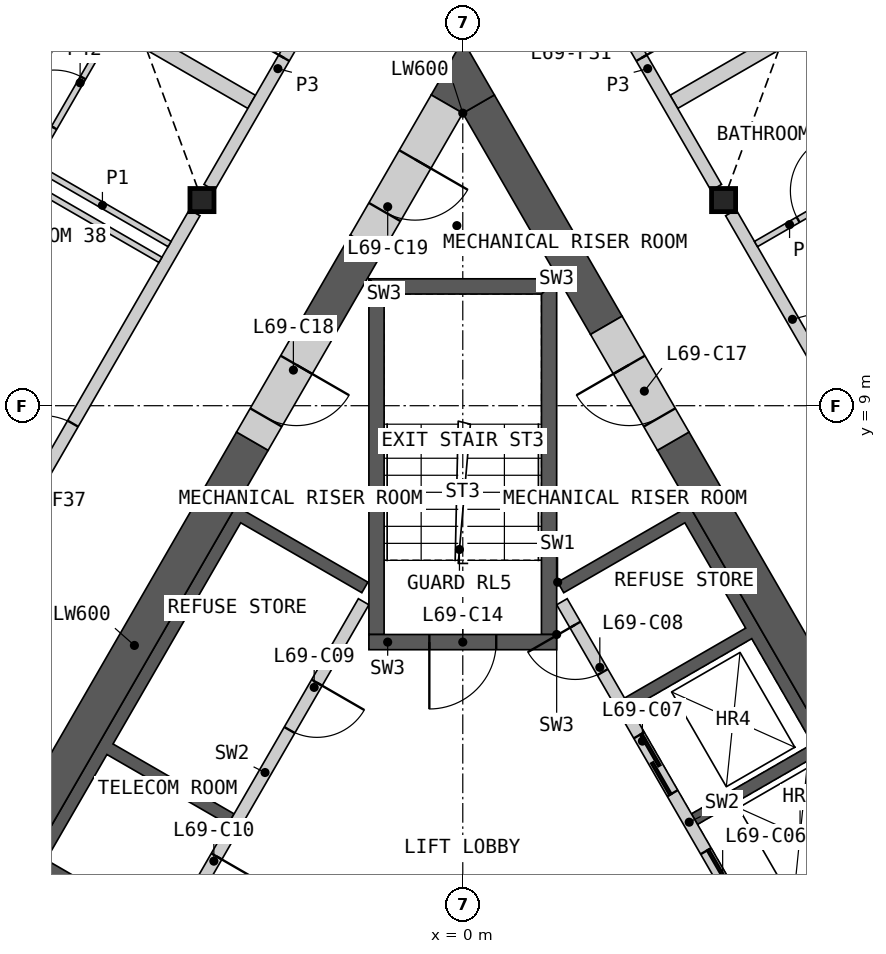
"""IFC4 building model, lengths in metres.
Left out: names, types, materials, properties, quantities, classifications, styles, units other than length and angle.
Written with IfcOpenShell. Run it as: python <this file> out.ifc"""

import sys

from ifc_helpers import new_model, si_unit, direction, frame, frame_2d, origin, origin_2d, place, context, subcontext, project, spatial, polyline, rectangle, i_section, outline, extrude, element, fill, save


model = new_model("IFC4")
c1 = context("Model", 3, precision=1e-05, world=origin(), true_north=direction((0.0, 1.0)))
c2 = subcontext(c1, "Body", "Model", "MODEL_VIEW")
j1 = project(units=[si_unit("LENGTHUNIT", "METRE"), si_unit("PLANEANGLEUNIT", "RADIAN")], contexts=[c1])
p1 = place(None, origin())
s1 = spatial("IfcSite", under=j1, at=p1, CompositionType="ELEMENT")
p2 = place(p1, origin())
s2 = spatial("IfcBuilding", under=s1, at=p2, CompositionType="ELEMENT")
p3 = place(p2, frame((0.0, 0.0, 315.4)))
s3 = spatial("IfcBuildingStorey", under=s2, at=p3, CompositionType="ELEMENT", Elevation=315.4)
for number, where, z_axis, x_axis in (
    (1, (-4.289, 12.382, 0.0), (0.0, 0.0, 1.0), (1.0, 0.0, 0.0)),
    (2, (4.289, 12.382, 0.0), (0.0, 0.0, 1.0), (1.0, 0.0, 0.0)),
):
    element("IfcColumn", number, at=place(p3, frame(where, z_axis=z_axis, x_axis=x_axis)), inside=s3, PredefinedType="COLUMN", context=c2, shape_type="SweptSolid", body=[
        extrude(i_section(OverallWidth=0.396, OverallDepth=0.381, WebThickness=0.019, FlangeThickness=0.03, at=origin_2d()), origin(), (0.0, 0.0, 1.0), 3.4),
    ])
p4 = place(p3, origin())
e3 = element("IfcWall", 3, at=p4, inside=s3, PredefinedType="SHEAR", context=c2, shape_type="SweptSolid", body=[
    extrude(outline(polyline([(1.561, 6.097), (3.731, 7.35), (8.231, -0.444), (6.061, -1.697), (5.96, -1.524), (7.952, -0.374), (6.952, 1.358), (4.96, 0.208), (4.861, 0.381), (6.852, 1.531), (5.852, 3.263), (3.861, 2.113), (3.76, 2.287), (5.752, 3.437), (4.752, 5.169), (2.76, 4.019), (2.66, 4.192), (4.652, 5.342), (3.652, 7.074), (1.66, 5.924), (1.561, 6.097)])), origin(), (0.0, 0.0, 1.0), 3.1),
])
p5 = place(p3, frame((5.817, -1.476, 0.0), z_axis=(0.0, 0.0, 1.0), x_axis=(-0.500002616675, 0.866023893041, 0.0)))
e4 = element("IfcWall", 4, at=p5, inside=s3, PredefinedType="SOLIDWALL", context=c2, shape_type="SweptSolid", body=[
    extrude(rectangle(XDim=8.373, YDim=0.2, at=frame_2d((4.187, 0.0))), origin(), (0.0, 0.0, 1.0), 3.1),
])
p6 = place(p5, frame((0.337, 0.0, 0.0)))
e5 = element("IfcOpeningElement", 5, at=p6, cuts=e4, PredefinedType="OPENING", context=c2, shape_type="SweptSolid", body=[
    extrude(rectangle(XDim=1.1, YDim=2.1, at=frame_2d((0.55, 1.05))), frame((0.0, 0.11, 0.0), z_axis=(0.0, -1.0, 0.0), x_axis=(1.0, 0.0, 0.0)), (0.0, 0.0, 1.0), 0.22),
])
p7 = place(p5, frame((2.537, 0.0, 0.0)))
e6 = element("IfcOpeningElement", 6, at=p7, cuts=e4, PredefinedType="OPENING", context=c2, shape_type="SweptSolid", body=[
    extrude(rectangle(XDim=1.1, YDim=2.1, at=frame_2d((0.55, 1.05))), frame((0.0, 0.11, 0.0), z_axis=(0.0, -1.0, 0.0), x_axis=(1.0, 0.0, 0.0)), (0.0, 0.0, 1.0), 0.22),
])
p8 = place(p5, frame((4.737, 0.0, 0.0)))
e7 = element("IfcOpeningElement", 7, at=p8, cuts=e4, PredefinedType="OPENING", context=c2, shape_type="SweptSolid", body=[
    extrude(rectangle(XDim=1.1, YDim=2.1, at=frame_2d((0.55, 1.05))), frame((0.0, 0.11, 0.0), z_axis=(0.0, -1.0, 0.0), x_axis=(1.0, 0.0, 0.0)), (0.0, 0.0, 1.0), 0.22),
])
p9 = place(p5, frame((7.037, 0.0, 0.0)))
e8 = element("IfcOpeningElement", 8, at=p9, cuts=e4, PredefinedType="OPENING", context=c2, shape_type="SweptSolid", body=[
    extrude(rectangle(XDim=0.9, YDim=2.1, at=frame_2d((0.45, 1.05))), frame((0.0, 0.11, 0.0), z_axis=(0.0, -1.0, 0.0), x_axis=(1.0, 0.0, 0.0)), (0.0, 0.0, 1.0), 0.22),
])
p10 = place(p3, origin())
e9 = element("IfcWall", 9, at=p10, inside=s3, PredefinedType="SHEAR", context=c2, shape_type="SweptSolid", body=[
    extrude(outline(polyline([(-4.96, 0.208), (-7.131, 1.461), (-3.731, 7.35), (-1.561, 6.097), (-1.66, 5.924), (-3.652, 7.074), (-5.752, 3.437), (-3.76, 2.287), (-3.861, 2.113), (-5.852, 3.263), (-6.852, 1.531), (-4.861, 0.381), (-4.96, 0.208)])), origin(), (0.0, 0.0, 1.0), 3.1),
])
p11 = place(p3, frame((-1.631, 5.776, 0.0), z_axis=(0.0, 0.0, 1.0), x_axis=(-0.499992876559, -0.866029516466, 0.0)))
e10 = element("IfcWall", 10, at=p11, inside=s3, PredefinedType="SOLIDWALL", context=c2, shape_type="SweptSolid", body=[
    extrude(rectangle(XDim=6.486, YDim=0.2, at=frame_2d((3.243, 0.0))), origin(), (0.0, 0.0, 1.0), 3.1),
])
p12 = place(p11, frame((1.537, 0.0, 0.0)))
e11 = element("IfcOpeningElement", 11, at=p12, cuts=e10, PredefinedType="OPENING", context=c2, shape_type="SweptSolid", body=[
    extrude(rectangle(XDim=0.9, YDim=2.1, at=frame_2d((0.45, 1.05))), frame((0.0, 0.11, 0.0), z_axis=(0.0, -1.0, 0.0), x_axis=(1.0, 0.0, 0.0)), (0.0, 0.0, 1.0), 0.22),
])
p13 = place(p11, frame((4.837, 0.0, 0.0)))
e12 = element("IfcOpeningElement", 12, at=p13, cuts=e10, PredefinedType="OPENING", context=c2, shape_type="SweptSolid", body=[
    extrude(rectangle(XDim=0.9, YDim=2.1, at=frame_2d((0.45, 1.05))), frame((0.0, 0.11, 0.0), z_axis=(0.0, -1.0, 0.0), x_axis=(1.0, 0.0, 0.0)), (0.0, 0.0, 1.0), 0.22),
])
p14 = place(p3, origin())
e13 = element("IfcWall", 13, at=p14, inside=s3, PredefinedType="SHEAR", context=c2, shape_type="SweptSolid", body=[
    extrude(outline(polyline([(1.544, 5.237), (1.544, 11.087), (1.294, 10.837), (1.294, 5.237), (1.544, 5.237)])), origin(), (0.0, 0.0, 1.0), 3.1),
])
p15 = place(p3, origin())
e14 = element("IfcWall", 14, at=p15, inside=s3, PredefinedType="SHEAR", context=c2, shape_type="SweptSolid", body=[
    extrude(outline(polyline([(1.544, 11.087), (-1.544, 11.087), (-1.294, 10.837), (1.294, 10.837), (1.544, 11.087)])), origin(), (0.0, 0.0, 1.0), 3.1),
])
p16 = place(p3, origin())
e15 = element("IfcWall", 15, at=p16, inside=s3, PredefinedType="SHEAR", context=c2, shape_type="SweptSolid", body=[
    extrude(outline(polyline([(-1.294, 10.837), (-1.544, 11.087), (-1.544, 5.237), (-1.294, 5.237), (-1.294, 10.837)])), origin(), (0.0, 0.0, 1.0), 3.1),
])
p17 = place(p3, frame((1.544, 5.112, 0.0), z_axis=(0.0, 0.0, 1.0), x_axis=(-1.0, 0.0, 0.0)))
e16 = element("IfcWall", 16, at=p17, inside=s3, PredefinedType="SHEAR", context=c2, shape_type="SweptSolid", body=[
    extrude(rectangle(XDim=3.088, YDim=0.25, at=frame_2d((1.544, 0.0))), origin(), (0.0, 0.0, 1.0), 3.1),
])
p18 = place(p17, frame((0.994, 0.0, 0.0)))
e17 = element("IfcOpeningElement", 17, at=p18, cuts=e16, PredefinedType="OPENING", context=c2, shape_type="SweptSolid", body=[
    extrude(rectangle(XDim=1.1, YDim=2.1, at=frame_2d((0.55, 1.05))), frame((0.0, 0.135, 0.0), z_axis=(0.0, -1.0, 0.0), x_axis=(1.0, 0.0, 0.0)), (0.0, 0.0, 1.0), 0.27),
])
p19 = place(p3, frame((8.686, -0.634, 0.0), z_axis=(0.0, 0.0, 1.0), x_axis=(-0.50001836461, 0.866014800712, 0.0)))
e18 = element("IfcWall", 18, at=p19, inside=s3, PredefinedType="SHEAR", context=c2, shape_type="SweptSolid", body=[
    extrude(rectangle(XDim=10.451, YDim=0.6, at=frame_2d((5.225, 0.0))), origin(), (0.0, 0.0, 1.0), 3.1),
])
p20 = place(p3, frame((2.361, 10.322, 0.0), z_axis=(0.0, 0.0, 1.0), x_axis=(-0.500000735859, 0.866024978935, 0.0)))
e19 = element("IfcWall", 19, at=p20, inside=s3, PredefinedType="SHEAR", context=c2, shape_type="SweptSolid", body=[
    extrude(rectangle(XDim=4.202, YDim=0.6, at=frame_2d((2.101, 0.0))), origin(), (0.0, 0.0, 1.0), 3.1),
])
p21 = place(p3, frame((-3.461, 8.417, 0.0), z_axis=(0.0, 0.0, 1.0), x_axis=(-0.50000391502, -0.866023143435, 0.0)))
e20 = element("IfcWall", 20, at=p21, inside=s3, PredefinedType="SHEAR", context=c2, shape_type="SweptSolid", body=[
    extrude(rectangle(XDim=7.759, YDim=0.6, at=frame_2d((3.879, 0.0))), origin(), (0.0, 0.0, 1.0), 3.1),
])
p22 = place(p3, frame((-1.59, 11.658, 0.0), z_axis=(0.0, 0.0, 1.0), x_axis=(-0.500037594623, -0.866003697431, 0.0)))
e21 = element("IfcWall", 21, at=p22, inside=s3, PredefinedType="SHEAR", context=c2, shape_type="SweptSolid", body=[
    extrude(rectangle(XDim=1.542, YDim=0.6, at=frame_2d((0.771, 0.0))), origin(), (0.0, 0.0, 1.0), 3.1),
])
p23 = place(p3, origin())
e22 = element("IfcWall", 22, at=p23, inside=s3, PredefinedType="SHEAR", context=c2, shape_type="SweptSolid", body=[
    extrude(outline(polyline([(0.0, 13.811), (-0.52, 14.111), (0.0, 15.011), (0.52, 14.111), (0.0, 13.811)])), origin(), (0.0, 0.0, 1.0), 3.1),
])
p24 = place(p3, frame((3.461, 8.417, 0.0), z_axis=(0.0, 0.0, 1.0), x_axis=(-0.499946605688, 0.86605622881, 0.0)))
e23 = element("IfcWall", 23, at=p24, inside=s3, PredefinedType="SHEAR", context=c2, shape_type="SweptSolid", body=[
    extrude(rectangle(XDim=2.2, YDim=0.6, at=frame_2d((1.1, 0.0))), origin(), (0.0, 0.0, 1.0), 3.1),
])
p25 = place(p24, frame((0.45, 0.0, 0.0)))
e24 = element("IfcOpeningElement", 24, at=p25, cuts=e23, PredefinedType="OPENING", context=c2, shape_type="SweptSolid", body=[
    extrude(rectangle(XDim=1.0, YDim=2.1, at=frame_2d((0.5, 1.05))), frame((0.0, 0.31, 0.0), z_axis=(0.0, -1.0, 0.0), x_axis=(1.0, 0.0, 0.0)), (0.0, 0.0, 1.0), 0.62),
])
p26 = place(p3, frame((-2.361, 10.322, 0.0), z_axis=(0.0, 0.0, 1.0), x_axis=(-0.499946605688, -0.86605622881, 0.0)))
e25 = element("IfcWall", 25, at=p26, inside=s3, PredefinedType="SHEAR", context=c2, shape_type="SweptSolid", body=[
    extrude(rectangle(XDim=2.2, YDim=0.6, at=frame_2d((1.1, 0.0))), origin(), (0.0, 0.0, 1.0), 3.1),
])
p27 = place(p26, frame((0.75, 0.0, 0.0)))
e26 = element("IfcOpeningElement", 26, at=p27, cuts=e25, PredefinedType="OPENING", context=c2, shape_type="SweptSolid", body=[
    extrude(rectangle(XDim=1.0, YDim=2.1, at=frame_2d((0.5, 1.05))), frame((0.0, 0.31, 0.0), z_axis=(0.0, -1.0, 0.0), x_axis=(1.0, 0.0, 0.0)), (0.0, 0.0, 1.0), 0.62),
])
p28 = place(p3, frame((-0.26, 13.961, 0.0), z_axis=(0.0, 0.0, 1.0), x_axis=(-0.49997936161, -0.866037319036, 0.0)))
e27 = element("IfcWall", 27, at=p28, inside=s3, PredefinedType="SHEAR", context=c2, shape_type="SweptSolid", body=[
    extrude(rectangle(XDim=2.66, YDim=0.6, at=frame_2d((1.33, 0.0))), origin(), (0.0, 0.0, 1.0), 3.1),
])
p29 = place(p28, frame((1.05, 0.0, 0.0)))
e28 = element("IfcOpeningElement", 28, at=p29, cuts=e27, PredefinedType="OPENING", context=c2, shape_type="SweptSolid", body=[
    extrude(rectangle(XDim=1.0, YDim=2.1, at=frame_2d((0.5, 1.05))), frame((0.0, 0.31, 0.0), z_axis=(0.0, -1.0, 0.0), x_axis=(1.0, 0.0, 0.0)), (0.0, 0.0, 1.0), 0.62),
])
p30 = place(p3, frame((3.472, 13.997, 0.0), z_axis=(0.0, 0.0, 1.0), x_axis=(0.866029233976, 0.499993365855, 0.0)))
e29 = element("IfcWall", 29, at=p30, inside=s3, PredefinedType="PARTITIONING", context=c2, shape_type="SweptSolid", body=[
    extrude(rectangle(XDim=12.637, YDim=0.25, at=frame_2d((6.319, 0.0))), origin(), (0.0, 0.0, 1.0), 2.33),
])
p31 = place(p3, frame((-8.458, 5.16, 0.0), z_axis=(0.0, 0.0, 1.0), x_axis=(0.499984266882, 0.866034487114, 0.0)))
e30 = element("IfcWall", 30, at=p31, inside=s3, PredefinedType="PARTITIONING", context=c2, shape_type="SweptSolid", body=[
    extrude(rectangle(XDim=8.099, YDim=0.2, at=frame_2d((4.049, 0.0))), origin(), (0.0, 0.0, 1.0), 3.1),
])
p32 = place(p31, frame((3.093, 0.0, 0.0)))
e31 = element("IfcOpeningElement", 31, at=p32, cuts=e30, PredefinedType="OPENING", context=c2, shape_type="SweptSolid", body=[
    extrude(rectangle(XDim=1.0, YDim=2.1, at=frame_2d((0.5, 1.05))), frame((0.0, 0.11, 0.0), z_axis=(0.0, -1.0, 0.0), x_axis=(1.0, 0.0, 0.0)), (0.0, 0.0, 1.0), 0.22),
])
p33 = place(p3, frame((4.409, 12.174, 0.0), z_axis=(0.0, 0.0, 1.0), x_axis=(0.499984266882, -0.866034487114, 0.0)))
e32 = element("IfcWall", 32, at=p33, inside=s3, PredefinedType="PARTITIONING", context=c2, shape_type="SweptSolid", body=[
    extrude(rectangle(XDim=8.099, YDim=0.2, at=frame_2d((4.049, 0.0))), origin(), (0.0, 0.0, 1.0), 3.1),
])
p34 = place(p33, frame((3.905, 0.0, 0.0)))
e33 = element("IfcOpeningElement", 33, at=p34, cuts=e32, PredefinedType="OPENING", context=c2, shape_type="SweptSolid", body=[
    extrude(rectangle(XDim=1.0, YDim=2.1, at=frame_2d((0.5, 1.05))), frame((0.0, 0.11, 0.0), z_axis=(0.0, -1.0, 0.0), x_axis=(1.0, 0.0, 0.0)), (0.0, 0.0, 1.0), 0.22),
])
p35 = place(p3, frame((-8.257, 16.76, 0.0), z_axis=(0.0, 0.0, 1.0), x_axis=(0.866034739526, -0.499983829672, 0.0)))
e34 = element("IfcWall", 34, at=p35, inside=s3, PredefinedType="PARTITIONING", context=c2, shape_type="SweptSolid", body=[
    extrude(rectangle(XDim=5.525, YDim=0.25, at=frame_2d((2.763, 0.0))), origin(), (0.0, 0.0, 1.0), 2.33),
])
p36 = place(p3, frame((1.913, 16.498, 0.0), z_axis=(0.0, 0.0, 1.0), x_axis=(0.499950370306, -0.866054055606, 0.0)))
e35 = element("IfcWall", 35, at=p36, inside=s3, PredefinedType="PARTITIONING", context=c2, shape_type="SweptSolid", body=[
    extrude(rectangle(XDim=4.513, YDim=0.2, at=frame_2d((2.256, 0.0))), origin(), (0.0, 0.0, 1.0), 3.1),
])
p37 = place(p36, frame((1.053, 0.0, 0.0)))
e36 = element("IfcOpeningElement", 36, at=p37, cuts=e35, PredefinedType="OPENING", context=c2, shape_type="SweptSolid", body=[
    extrude(rectangle(XDim=1.0, YDim=2.1, at=frame_2d((0.5, 1.05))), frame((0.0, 0.11, 0.0), z_axis=(0.0, -1.0, 0.0), x_axis=(1.0, 0.0, 0.0)), (0.0, 0.0, 1.0), 0.22),
])
p38 = place(p3, frame((-4.169, 12.59, 0.0), z_axis=(0.0, 0.0, 1.0), x_axis=(0.499950370306, 0.866054055606, 0.0)))
e37 = element("IfcWall", 37, at=p38, inside=s3, PredefinedType="PARTITIONING", context=c2, shape_type="SweptSolid", body=[
    extrude(rectangle(XDim=4.513, YDim=0.2, at=frame_2d((2.256, 0.0))), origin(), (0.0, 0.0, 1.0), 3.1),
])
p39 = place(p38, frame((2.459, 0.0, 0.0)))
e38 = element("IfcOpeningElement", 38, at=p39, cuts=e37, PredefinedType="OPENING", context=c2, shape_type="SweptSolid", body=[
    extrude(rectangle(XDim=1.0, YDim=2.1, at=frame_2d((0.5, 1.05))), frame((0.0, 0.11, 0.0), z_axis=(0.0, -1.0, 0.0), x_axis=(1.0, 0.0, 0.0)), (0.0, 0.0, 1.0), 0.22),
])
p40 = place(p3, frame((-9.783, 14.177, 0.0), z_axis=(0.0, 0.0, 1.0), x_axis=(0.866030435321, -0.499991285022, 0.0)))
e39 = element("IfcWall", 39, at=p40, inside=s3, PredefinedType="PARTITIONING", context=c2, shape_type="SweptSolid", body=[
    extrude(rectangle(XDim=5.555, YDim=0.1, at=frame_2d((2.778, 0.0))), origin(), (0.0, 0.0, 1.0), 2.33),
])
p41 = place(p40, frame((1.852, 0.0, 0.0)))
e40 = element("IfcOpeningElement", 40, at=p41, cuts=e39, PredefinedType="OPENING", context=c2, shape_type="SweptSolid", body=[
    extrude(rectangle(XDim=0.95, YDim=2.1, at=frame_2d((0.475, 1.05))), frame((0.0, 0.06, 0.0), z_axis=(0.0, -1.0, 0.0), x_axis=(1.0, 0.0, 0.0)), (0.0, 0.0, 1.0), 0.12),
])
p42 = place(p3, frame((4.349, 17.679, 0.0), z_axis=(0.0, 0.0, 1.0), x_axis=(0.49997732567, -0.866038494419, 0.0)))
e41 = element("IfcWall", 41, at=p42, inside=s3, PredefinedType="PARTITIONING", context=c2, shape_type="SweptSolid", body=[
    extrude(rectangle(XDim=5.5, YDim=0.1, at=frame_2d((2.75, 0.0))), origin(), (0.0, 0.0, 1.0), 2.33),
])
p43 = place(p3, frame((-7.099, 12.915, 0.0), z_axis=(0.0, 0.0, 1.0), x_axis=(0.49997732567, 0.866038494419, 0.0)))
e42 = element("IfcWall", 42, at=p43, inside=s3, PredefinedType="PARTITIONING", context=c2, shape_type="SweptSolid", body=[
    extrude(rectangle(XDim=5.5, YDim=0.1, at=frame_2d((2.75, 0.0))), origin(), (0.0, 0.0, 1.0), 2.33),
])
p44 = place(p43, frame((0.756, 0.0, 0.0)))
e43 = element("IfcOpeningElement", 43, at=p44, cuts=e42, PredefinedType="OPENING", context=c2, shape_type="SweptSolid", body=[
    extrude(rectangle(XDim=0.95, YDim=2.1, at=frame_2d((0.475, 1.05))), frame((0.0, 0.06, 0.0), z_axis=(0.0, -1.0, 0.0), x_axis=(1.0, 0.0, 0.0)), (0.0, 0.0, 1.0), 0.12),
])
p45 = place(p3, frame((4.822, 11.659, 0.0), z_axis=(0.0, 0.0, 1.0), x_axis=(0.866030925526, 0.499990435942, 0.0)))
e44 = element("IfcWall", 44, at=p45, inside=s3, PredefinedType="PARTITIONING", context=c2, shape_type="SweptSolid", body=[
    extrude(rectangle(XDim=2.55, YDim=0.1, at=frame_2d((1.275, 0.0))), origin(), (0.0, 0.0, 1.0), 2.33),
])
p46 = place(p45, frame((0.8, 0.0, 0.0)))
e45 = element("IfcOpeningElement", 45, at=p46, cuts=e44, PredefinedType="OPENING", context=c2, shape_type="SweptSolid", body=[
    extrude(rectangle(XDim=0.95, YDim=2.1, at=frame_2d((0.475, 1.05))), frame((0.0, 0.06, 0.0), z_axis=(0.0, -1.0, 0.0), x_axis=(1.0, 0.0, 0.0)), (0.0, 0.0, 1.0), 0.12),
])
p47 = place(p3, frame((-7.031, 12.934, 0.0), z_axis=(0.0, 0.0, 1.0), x_axis=(0.866030925526, -0.499990435942, 0.0)))
e46 = element("IfcWall", 46, at=p47, inside=s3, PredefinedType="PARTITIONING", context=c2, shape_type="SweptSolid", body=[
    extrude(rectangle(XDim=2.55, YDim=0.1, at=frame_2d((1.275, 0.0))), origin(), (0.0, 0.0, 1.0), 2.33),
])
p48 = place(p7, origin())
e47 = element("IfcDoor", 47, at=p48, inside=s3, OperationType="SLIDING_TO_LEFT", PredefinedType="DOOR", context=c2, shape_type="SweptSolid", body=[
    extrude(rectangle(XDim=1.1, YDim=2.1, at=frame_2d((0.55, 1.05))), frame((0.0, 0.025, 0.0), z_axis=(0.0, -1.0, 0.0), x_axis=(1.0, 0.0, 0.0)), (0.0, 0.0, 1.0), 0.05),
])
fill(e6, e47)
p49 = place(p8, origin())
e48 = element("IfcDoor", 48, at=p49, inside=s3, OperationType="SLIDING_TO_LEFT", PredefinedType="DOOR", context=c2, shape_type="SweptSolid", body=[
    extrude(rectangle(XDim=1.1, YDim=2.1, at=frame_2d((0.55, 1.05))), frame((0.0, 0.025, 0.0), z_axis=(0.0, -1.0, 0.0), x_axis=(1.0, 0.0, 0.0)), (0.0, 0.0, 1.0), 0.05),
])
fill(e7, e48)
p50 = place(p9, origin())
e49 = element("IfcDoor", 49, at=p50, inside=s3, OperationType="SINGLE_SWING_RIGHT", PredefinedType="DOOR", context=c2, shape_type="SweptSolid", body=[
    extrude(rectangle(XDim=0.9, YDim=2.1, at=frame_2d((0.45, 1.05))), frame((0.0, 0.025, 0.0), z_axis=(0.0, -1.0, 0.0), x_axis=(1.0, 0.0, 0.0)), (0.0, 0.0, 1.0), 0.05),
])
fill(e8, e49)
p51 = place(p12, origin())
e50 = element("IfcDoor", 50, at=p51, inside=s3, OperationType="SINGLE_SWING_LEFT", PredefinedType="DOOR", context=c2, shape_type="SweptSolid", body=[
    extrude(rectangle(XDim=0.9, YDim=2.1, at=frame_2d((0.45, 1.05))), frame((0.0, 0.025, 0.0), z_axis=(0.0, -1.0, 0.0), x_axis=(1.0, 0.0, 0.0)), (0.0, 0.0, 1.0), 0.05),
])
fill(e11, e50)
p52 = place(p13, origin())
e51 = element("IfcDoor", 51, at=p52, inside=s3, OperationType="SINGLE_SWING_LEFT", PredefinedType="DOOR", context=c2, shape_type="SweptSolid", body=[
    extrude(rectangle(XDim=0.9, YDim=2.1, at=frame_2d((0.45, 1.05))), frame((0.0, 0.025, 0.0), z_axis=(0.0, -1.0, 0.0), x_axis=(1.0, 0.0, 0.0)), (0.0, 0.0, 1.0), 0.05),
])
fill(e12, e51)
p53 = place(p18, origin())
e52 = element("IfcDoor", 52, at=p53, inside=s3, OperationType="SINGLE_SWING_RIGHT", PredefinedType="DOOR", context=c2, shape_type="SweptSolid", body=[
    extrude(rectangle(XDim=1.1, YDim=2.1, at=frame_2d((0.55, 1.05))), frame((0.0, 0.025, 0.0), z_axis=(0.0, -1.0, 0.0), x_axis=(1.0, 0.0, 0.0)), (0.0, 0.0, 1.0), 0.05),
])
fill(e17, e52)
p54 = place(p25, origin())
e53 = element("IfcDoor", 53, at=p54, inside=s3, OperationType="SINGLE_SWING_RIGHT", PredefinedType="DOOR", context=c2, shape_type="SweptSolid", body=[
    extrude(rectangle(XDim=1.0, YDim=2.1, at=frame_2d((0.5, 1.05))), frame((0.0, 0.055, 0.0), z_axis=(0.0, -1.0, 0.0), x_axis=(1.0, 0.0, 0.0)), (0.0, 0.0, 1.0), 0.05),
])
fill(e24, e53)
p55 = place(p27, origin())
e54 = element("IfcDoor", 54, at=p55, inside=s3, OperationType="SINGLE_SWING_LEFT", PredefinedType="DOOR", context=c2, shape_type="SweptSolid", body=[
    extrude(rectangle(XDim=1.0, YDim=2.1, at=frame_2d((0.5, 1.05))), frame((0.0, 0.055, 0.0), z_axis=(0.0, -1.0, 0.0), x_axis=(1.0, 0.0, 0.0)), (0.0, 0.0, 1.0), 0.05),
])
fill(e26, e54)
p56 = place(p29, origin())
e55 = element("IfcDoor", 55, at=p56, inside=s3, OperationType="SINGLE_SWING_LEFT", PredefinedType="DOOR", context=c2, shape_type="SweptSolid", body=[
    extrude(rectangle(XDim=1.0, YDim=2.1, at=frame_2d((0.5, 1.05))), frame((0.0, 0.055, 0.0), z_axis=(0.0, -1.0, 0.0), x_axis=(1.0, 0.0, 0.0)), (0.0, 0.0, 1.0), 0.05),
])
fill(e28, e55)
p57 = place(p46, origin())
e56 = element("IfcDoor", 56, at=p57, inside=s3, OperationType="SINGLE_SWING_RIGHT", PredefinedType="DOOR", context=c2, shape_type="SweptSolid", body=[
    extrude(rectangle(XDim=0.95, YDim=2.1, at=frame_2d((0.475, 1.05))), frame((0.0, 0.025, 0.0), z_axis=(0.0, -1.0, 0.0), x_axis=(1.0, 0.0, 0.0)), (0.0, 0.0, 1.0), 0.05),
])
fill(e45, e56)
p58 = place(p37, origin())
e57 = element("IfcDoor", 57, at=p58, inside=s3, OperationType="SINGLE_SWING_RIGHT", PredefinedType="DOOR", context=c2, shape_type="SweptSolid", body=[
    extrude(rectangle(XDim=1.0, YDim=2.1, at=frame_2d((0.5, 1.05))), frame((0.0, 0.025, 0.0), z_axis=(0.0, -1.0, 0.0), x_axis=(1.0, 0.0, 0.0)), (0.0, 0.0, 1.0), 0.05),
])
fill(e36, e57)
p59 = place(p39, origin())
e58 = element("IfcDoor", 58, at=p59, inside=s3, OperationType="SINGLE_SWING_LEFT", PredefinedType="DOOR", context=c2, shape_type="SweptSolid", body=[
    extrude(rectangle(XDim=1.0, YDim=2.1, at=frame_2d((0.5, 1.05))), frame((0.0, 0.025, 0.0), z_axis=(0.0, -1.0, 0.0), x_axis=(1.0, 0.0, 0.0)), (0.0, 0.0, 1.0), 0.05),
])
fill(e38, e58)
p60 = place(p32, origin())
e59 = element("IfcDoor", 59, at=p60, inside=s3, OperationType="SINGLE_SWING_LEFT", PredefinedType="DOOR", context=c2, shape_type="SweptSolid", body=[
    extrude(rectangle(XDim=1.0, YDim=2.1, at=frame_2d((0.5, 1.05))), frame((0.0, 0.025, 0.0), z_axis=(0.0, -1.0, 0.0), x_axis=(1.0, 0.0, 0.0)), (0.0, 0.0, 1.0), 0.05),
])
fill(e31, e59)
p61 = place(p44, origin())
e60 = element("IfcDoor", 60, at=p61, inside=s3, OperationType="SINGLE_SWING_LEFT", PredefinedType="DOOR", context=c2, shape_type="SweptSolid", body=[
    extrude(rectangle(XDim=0.95, YDim=2.1, at=frame_2d((0.475, 1.05))), frame((0.0, 0.025, 0.0), z_axis=(0.0, -1.0, 0.0), x_axis=(1.0, 0.0, 0.0)), (0.0, 0.0, 1.0), 0.05),
])
fill(e43, e60)
save(model, sys.argv[1])
